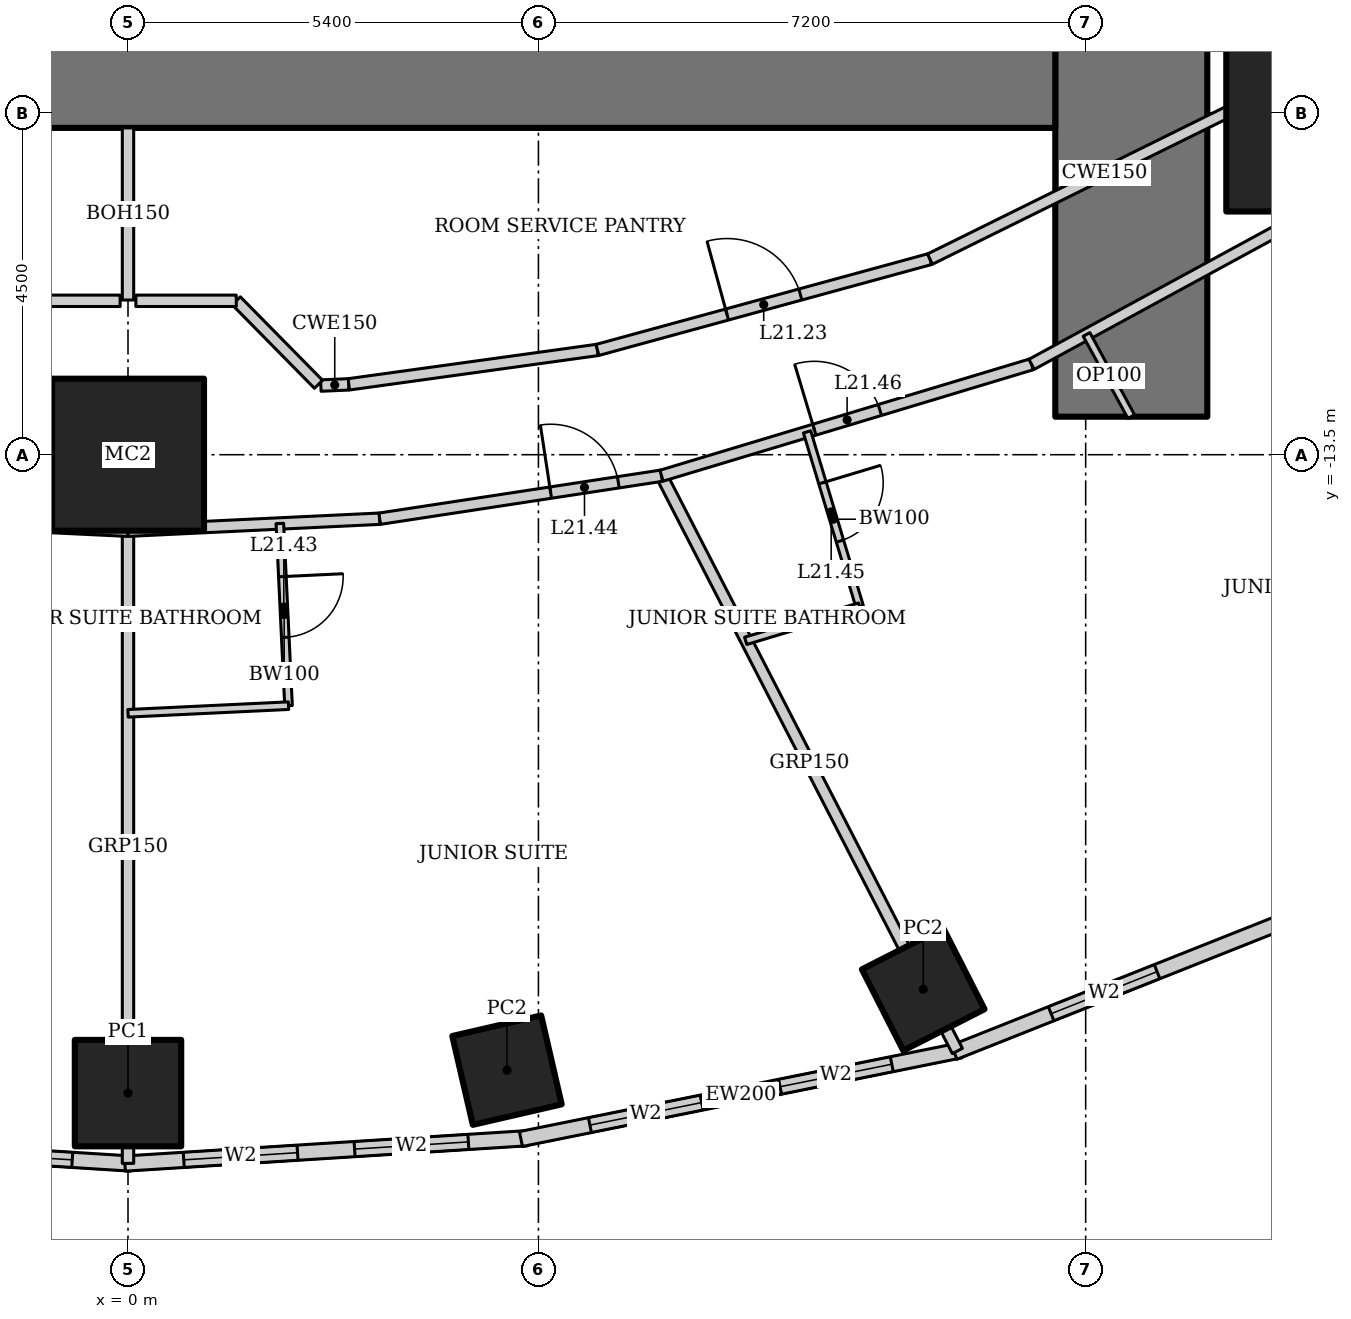
"""IFC4 building model, lengths in metres.
Left out: names, types, materials, properties, quantities, classifications, styles, units other than length and angle.
Written with IfcOpenShell. Run it as: python <this file> out.ifc"""

import sys

from ifc_helpers import new_model, si_unit, direction, frame, frame_2d, origin, origin_2d, place, context, subcontext, project, spatial, rectangle, hollow_rectangle, extrude, element, fill, save


model = new_model("IFC4")
c1 = context("Model", 3, precision=1e-05, world=origin(), true_north=direction((0.0, 1.0)))
c2 = subcontext(c1, "Body", "Model", "MODEL_VIEW")
j1 = project(units=[si_unit("LENGTHUNIT", "METRE"), si_unit("PLANEANGLEUNIT", "RADIAN")], contexts=[c1])
p1 = place(None, origin())
s1 = spatial("IfcSite", under=j1, at=p1, CompositionType="ELEMENT")
p2 = place(p1, origin())
s2 = spatial("IfcBuilding", under=s1, at=p2, CompositionType="ELEMENT")
p3 = place(p2, frame((0.0, 0.0, 91.0)))
s3 = spatial("IfcBuildingStorey", under=s2, at=p3, CompositionType="ELEMENT", Elevation=91.0)
p4 = place(p3, frame((0.0, -13.5, 0.0), z_axis=(0.0, 0.0, 1.0), x_axis=(1.0, 0.0, 0.0)))
e1 = element("IfcColumn", 1, at=p4, inside=s3, PredefinedType="COLUMN", context=c2, shape_type="SweptSolid", body=[
    extrude(hollow_rectangle(XDim=2.0, YDim=2.0, WallThickness=0.17, at=origin_2d()), origin(), (0.0, 0.0, 1.0), 3.6),
])
p5 = place(p3, frame((15.75, -9.0, 0.0), z_axis=(0.0, 0.0, 1.0), x_axis=(1.0, 0.0, 0.0)))
e2 = element("IfcColumn", 2, at=p5, inside=s3, PredefinedType="COLUMN", context=c2, shape_type="SweptSolid", body=[
    extrude(hollow_rectangle(XDim=2.6, YDim=2.6, WallThickness=0.13, at=origin_2d()), origin(), (0.0, 0.0, 1.0), 3.6),
])
p6 = place(p3, frame((0.0, -21.9, 0.0), z_axis=(0.0, 0.0, 1.0), x_axis=(1.0, 0.0, 0.0)))
e3 = element("IfcColumn", 3, at=p6, inside=s3, PredefinedType="COLUMN", context=c2, shape_type="SweptSolid", body=[
    extrude(hollow_rectangle(XDim=1.4, YDim=1.4, WallThickness=0.1, at=origin_2d()), origin(), (0.0, 0.0, 1.0), 3.6),
])
for number, where, z_axis, x_axis in (
    (4, (4.986, -21.598, 0.0), (0.0, 0.0, 1.0), (0.974, 0.225, 0.0)),
    (5, (10.463, -20.534, 0.0), (0.0, 0.0, 1.0), (0.891, 0.454, 0.0)),
):
    element("IfcColumn", number, at=place(p3, frame(where, z_axis=z_axis, x_axis=x_axis)), inside=s3, PredefinedType="COLUMN", context=c2, shape_type="SweptSolid", body=[
        extrude(hollow_rectangle(XDim=1.2, YDim=1.2, WallThickness=0.1, at=origin_2d()), origin(), (0.0, 0.0, 1.0), 3.6),
    ])
p7 = place(p3, frame((13.2, -13.0, 0.0), z_axis=(0.0, 0.0, 1.0), x_axis=(0.0, 1.0, 0.0)))
e6 = element("IfcWall", 6, at=p7, inside=s3, PredefinedType="SHEAR", context=c2, shape_type="SweptSolid", body=[
    extrude(rectangle(XDim=26.0, YDim=2.0, at=frame_2d((13.0, 0.0))), origin(), (0.0, 0.0, 1.0), 3.6),
])
p8 = place(p7, frame((12.1, 0.0, 0.0)))
e7 = element("IfcOpeningElement", 7, at=p8, cuts=e6, PredefinedType="OPENING", context=c2, shape_type="SweptSolid", body=[
    extrude(rectangle(XDim=1.8, YDim=2.1, at=frame_2d((0.9, 1.05))), frame((0.0, 1.01, 0.0), z_axis=(0.0, -1.0, 0.0), x_axis=(1.0, 0.0, 0.0)), (0.0, 0.0, 1.0), 2.02),
])
p9 = place(p3, frame((-12.2, -8.0, 0.0), z_axis=(0.0, 0.0, 1.0), x_axis=(1.0, 0.0, 0.0)))
e8 = element("IfcWall", 8, at=p9, inside=s3, PredefinedType="SHEAR", context=c2, shape_type="SweptSolid", body=[
    extrude(rectangle(XDim=24.4, YDim=2.4, at=frame_2d((12.2, 0.0))), origin(), (0.0, 0.0, 1.0), 3.6),
])
p10 = place(p3, frame((-5.253, -22.493, 0.0), z_axis=(0.0, 0.0, 1.0), x_axis=(0.998018582375, -0.062919863585, 0.0)))
e9 = element("IfcWall", 9, at=p10, inside=s3, PredefinedType="SOLIDWALL", context=c2, shape_type="SweptSolid", body=[
    extrude(rectangle(XDim=5.304, YDim=0.2, at=frame_2d((2.652, 0.0))), origin(), (0.0, 0.0, 1.0), 3.45),
])
p11 = place(p10, frame((0.776, 0.0, 0.5)))
e10 = element("IfcOpeningElement", 10, at=p11, cuts=e9, PredefinedType="OPENING", context=c2, shape_type="SweptSolid", body=[
    extrude(rectangle(XDim=1.5, YDim=2.2, at=frame_2d((0.75, 1.1))), frame((0.0, 0.11, 0.0), z_axis=(0.0, -1.0, 0.0), x_axis=(1.0, 0.0, 0.0)), (0.0, 0.0, 1.0), 0.22),
])
p12 = place(p10, frame((3.028, 0.0, 0.5)))
e11 = element("IfcOpeningElement", 11, at=p12, cuts=e9, PredefinedType="OPENING", context=c2, shape_type="SweptSolid", body=[
    extrude(rectangle(XDim=1.5, YDim=2.2, at=frame_2d((0.75, 1.1))), frame((0.0, 0.11, 0.0), z_axis=(0.0, -1.0, 0.0), x_axis=(1.0, 0.0, 0.0)), (0.0, 0.0, 1.0), 0.22),
])
p13 = place(p3, frame((-0.041, -22.827, 0.0), z_axis=(0.0, 0.0, 1.0), x_axis=(0.998018582375, 0.062919863585, 0.0)))
e12 = element("IfcWall", 12, at=p13, inside=s3, PredefinedType="SOLIDWALL", context=c2, shape_type="SweptSolid", body=[
    extrude(rectangle(XDim=5.304, YDim=0.2, at=frame_2d((2.652, 0.0))), origin(), (0.0, 0.0, 1.0), 3.45),
])
p14 = place(p13, frame((0.776, 0.0, 0.5)))
e13 = element("IfcOpeningElement", 13, at=p14, cuts=e12, PredefinedType="OPENING", context=c2, shape_type="SweptSolid", body=[
    extrude(rectangle(XDim=1.5, YDim=2.2, at=frame_2d((0.75, 1.1))), frame((0.0, 0.11, 0.0), z_axis=(0.0, -1.0, 0.0), x_axis=(1.0, 0.0, 0.0)), (0.0, 0.0, 1.0), 0.22),
])
p15 = place(p13, frame((3.028, 0.0, 0.5)))
e14 = element("IfcOpeningElement", 14, at=p15, cuts=e12, PredefinedType="OPENING", context=c2, shape_type="SweptSolid", body=[
    extrude(rectangle(XDim=1.5, YDim=2.2, at=frame_2d((0.75, 1.1))), frame((0.0, 0.11, 0.0), z_axis=(0.0, -1.0, 0.0), x_axis=(1.0, 0.0, 0.0)), (0.0, 0.0, 1.0), 0.22),
])
p16 = place(p3, frame((5.17, -22.504, 0.0), z_axis=(0.0, 0.0, 1.0), x_axis=(0.980251657452, 0.197754110105, 0.0)))
e15 = element("IfcWall", 15, at=p16, inside=s3, PredefinedType="SOLIDWALL", context=c2, shape_type="SweptSolid", body=[
    extrude(rectangle(XDim=5.904, YDim=0.2, at=frame_2d((2.952, 0.0))), origin(), (0.0, 0.0, 1.0), 3.45),
])
p17 = place(p16, frame((0.926, 0.0, 0.5)))
e16 = element("IfcOpeningElement", 16, at=p17, cuts=e15, PredefinedType="OPENING", context=c2, shape_type="SweptSolid", body=[
    extrude(rectangle(XDim=1.5, YDim=2.2, at=frame_2d((0.75, 1.1))), frame((0.0, 0.11, 0.0), z_axis=(0.0, -1.0, 0.0), x_axis=(1.0, 0.0, 0.0)), (0.0, 0.0, 1.0), 0.22),
])
p18 = place(p16, frame((3.478, 0.0, 0.5)))
e17 = element("IfcOpeningElement", 17, at=p18, cuts=e15, PredefinedType="OPENING", context=c2, shape_type="SweptSolid", body=[
    extrude(rectangle(XDim=1.5, YDim=2.2, at=frame_2d((0.75, 1.1))), frame((0.0, 0.11, 0.0), z_axis=(0.0, -1.0, 0.0), x_axis=(1.0, 0.0, 0.0)), (0.0, 0.0, 1.0), 0.22),
])
p19 = place(p3, frame((10.869, -21.363, 0.0), z_axis=(0.0, 0.0, 1.0), x_axis=(0.929358351251, 0.369178892895, 0.0)))
e18 = element("IfcWall", 18, at=p19, inside=s3, PredefinedType="SOLIDWALL", context=c2, shape_type="SweptSolid", body=[
    extrude(rectangle(XDim=7.692, YDim=0.2, at=frame_2d((3.846, 0.0))), origin(), (0.0, 0.0, 1.0), 3.45),
])
p20 = place(p19, frame((1.373, 0.0, 0.5)))
e19 = element("IfcOpeningElement", 19, at=p20, cuts=e18, PredefinedType="OPENING", context=c2, shape_type="SweptSolid", body=[
    extrude(rectangle(XDim=1.5, YDim=2.2, at=frame_2d((0.75, 1.1))), frame((0.0, 0.11, 0.0), z_axis=(0.0, -1.0, 0.0), x_axis=(1.0, 0.0, 0.0)), (0.0, 0.0, 1.0), 0.22),
])
p21 = place(p19, frame((4.819, 0.0, 0.5)))
e20 = element("IfcOpeningElement", 20, at=p21, cuts=e18, PredefinedType="OPENING", context=c2, shape_type="SweptSolid", body=[
    extrude(rectangle(XDim=1.5, YDim=2.2, at=frame_2d((0.75, 1.1))), frame((0.0, 0.11, 0.0), z_axis=(0.0, -1.0, 0.0), x_axis=(1.0, 0.0, 0.0)), (0.0, 0.0, 1.0), 0.22),
])
p22 = place(p3, frame((0.0, -22.825, 0.0), z_axis=(0.0, 0.0, 1.0), x_axis=(0.0, 1.0, 0.0)))
e21 = element("IfcWall", 21, at=p22, inside=s3, PredefinedType="PARTITIONING", context=c2, shape_type="SweptSolid", body=[
    extrude(rectangle(XDim=8.325, YDim=0.15, at=frame_2d((4.162, 0.0))), origin(), (0.0, 0.0, 1.0), 2.924),
])
p23 = place(p3, frame((10.912, -21.346, 0.0), z_axis=(0.0, 0.0, 1.0), x_axis=(-0.457327273085, 0.889298468059, 0.0)))
e22 = element("IfcWall", 22, at=p23, inside=s3, PredefinedType="PARTITIONING", context=c2, shape_type="SweptSolid", body=[
    extrude(rectangle(XDim=8.511, YDim=0.15, at=frame_2d((4.256, 0.0))), origin(), (0.0, 0.0, 1.0), 2.528),
])
p24 = place(p3, frame((-3.311, -14.342, 0.0), z_axis=(0.0, 0.0, 1.0), x_axis=(0.998863968075, -0.047652631422, 0.0)))
e23 = element("IfcWall", 23, at=p24, inside=s3, PredefinedType="PARTITIONING", context=c2, shape_type="SweptSolid", body=[
    extrude(rectangle(XDim=3.315, YDim=0.15, at=frame_2d((1.657, 0.0))), origin(), (0.0, 0.0, 1.0), 3.45),
])
p25 = place(p24, frame((0.15, 0.0, 0.0)))
e24 = element("IfcOpeningElement", 24, at=p25, cuts=e23, PredefinedType="OPENING", context=c2, shape_type="SweptSolid", body=[
    extrude(rectangle(XDim=0.9, YDim=2.1, at=frame_2d((0.45, 1.05))), frame((0.0, 0.085, 0.0), z_axis=(0.0, -1.0, 0.0), x_axis=(1.0, 0.0, 0.0)), (0.0, 0.0, 1.0), 0.17),
])
p26 = place(p3, frame((0.0, -14.5, 0.0), z_axis=(0.0, 0.0, 1.0), x_axis=(0.998863968075, 0.047652631422, 0.0)))
e25 = element("IfcWall", 25, at=p26, inside=s3, PredefinedType="PARTITIONING", context=c2, shape_type="SweptSolid", body=[
    extrude(rectangle(XDim=3.315, YDim=0.15, at=frame_2d((1.657, 0.0))), origin(), (0.0, 0.0, 1.0), 3.45),
])
p27 = place(p3, frame((3.311, -14.342, 0.0), z_axis=(0.0, 0.0, 1.0), x_axis=(0.988564270062, 0.150800145746, 0.0)))
e26 = element("IfcWall", 26, at=p27, inside=s3, PredefinedType="PARTITIONING", context=c2, shape_type="SweptSolid", body=[
    extrude(rectangle(XDim=3.751, YDim=0.15, at=frame_2d((1.875, 0.0))), origin(), (0.0, 0.0, 1.0), 3.45),
])
p28 = place(p27, frame((2.276, 0.0, 0.0)))
e27 = element("IfcOpeningElement", 27, at=p28, cuts=e26, PredefinedType="OPENING", context=c2, shape_type="SweptSolid", body=[
    extrude(rectangle(XDim=0.9, YDim=2.1, at=frame_2d((0.45, 1.05))), frame((0.0, 0.085, 0.0), z_axis=(0.0, -1.0, 0.0), x_axis=(1.0, 0.0, 0.0)), (0.0, 0.0, 1.0), 0.17),
])
p29 = place(p3, frame((7.019, -13.776, 0.0), z_axis=(0.0, 0.0, 1.0), x_axis=(0.957564241242, 0.288219922793, 0.0)))
e28 = element("IfcWall", 28, at=p29, inside=s3, PredefinedType="PARTITIONING", context=c2, shape_type="SweptSolid", body=[
    extrude(rectangle(XDim=5.085, YDim=0.15, at=frame_2d((2.542, 0.0))), origin(), (0.0, 0.0, 1.0), 3.45),
])
p30 = place(p29, frame((2.1, 0.0, 0.0)))
e29 = element("IfcOpeningElement", 29, at=p30, cuts=e28, PredefinedType="OPENING", context=c2, shape_type="SweptSolid", body=[
    extrude(rectangle(XDim=0.9, YDim=2.1, at=frame_2d((0.45, 1.05))), frame((0.0, 0.085, 0.0), z_axis=(0.0, -1.0, 0.0), x_axis=(1.0, 0.0, 0.0)), (0.0, 0.0, 1.0), 0.17),
])
p31 = place(p3, frame((11.888, -12.311, 0.0), z_axis=(0.0, 0.0, 1.0), x_axis=(0.878450059298, 0.477834169267, 0.0)))
e30 = element("IfcWall", 30, at=p31, inside=s3, PredefinedType="PARTITIONING", context=c2, shape_type="SweptSolid", body=[
    extrude(rectangle(XDim=5.631, YDim=0.15, at=frame_2d((2.815, 0.0))), origin(), (0.0, 0.0, 1.0), 3.45),
])
p32 = place(p3, frame((2.903, -12.574, 0.0), z_axis=(0.0, 0.0, 1.0), x_axis=(0.990563451353, 0.137054911782, 0.0)))
e31 = element("IfcWall", 31, at=p32, inside=s3, PredefinedType="PARTITIONING", context=c2, shape_type="SweptSolid", body=[
    extrude(rectangle(XDim=3.304, YDim=0.15, at=frame_2d((1.652, 0.0))), origin(), (0.0, 0.0, 1.0), 3.45),
])
p33 = place(p3, frame((6.176, -12.122, 0.0), z_axis=(0.0, 0.0, 1.0), x_axis=(0.964644466646, 0.263554648923, 0.0)))
e32 = element("IfcWall", 32, at=p33, inside=s3, PredefinedType="PARTITIONING", context=c2, shape_type="SweptSolid", body=[
    extrude(rectangle(XDim=4.535, YDim=0.15, at=frame_2d((2.268, 0.0))), origin(), (0.0, 0.0, 1.0), 3.45),
])
p34 = place(p33, frame((1.768, 0.0, 0.0)))
e33 = element("IfcOpeningElement", 33, at=p34, cuts=e32, PredefinedType="OPENING", context=c2, shape_type="SweptSolid", body=[
    extrude(rectangle(XDim=1.0, YDim=2.1, at=frame_2d((0.5, 1.05))), frame((0.0, 0.085, 0.0), z_axis=(0.0, -1.0, 0.0), x_axis=(1.0, 0.0, 0.0)), (0.0, 0.0, 1.0), 0.17),
])
p35 = place(p3, frame((10.551, -10.926, 0.0), z_axis=(0.0, 0.0, 1.0), x_axis=(0.89656943448, 0.442903205177, 0.0)))
e34 = element("IfcWall", 34, at=p35, inside=s3, PredefinedType="PARTITIONING", context=c2, shape_type="SweptSolid", body=[
    extrude(rectangle(XDim=5.126, YDim=0.15, at=frame_2d((2.563, 0.0))), origin(), (0.0, 0.0, 1.0), 3.45),
])
p36 = place(p3, frame((1.998, -14.405, 0.0), z_axis=(0.0, 0.0, 1.0), x_axis=(0.047608648396, -0.998866065395, 0.0)))
e35 = element("IfcWall", 35, at=p36, inside=s3, PredefinedType="PARTITIONING", context=c2, shape_type="SweptSolid", body=[
    extrude(rectangle(XDim=2.4, YDim=0.1, at=frame_2d((1.2, 0.0))), origin(), (0.0, 0.0, 1.0), 2.749),
])
p37 = place(p36, frame((0.7, 0.0, 0.0)))
e36 = element("IfcOpeningElement", 36, at=p37, cuts=e35, PredefinedType="OPENING", context=c2, shape_type="SweptSolid", body=[
    extrude(rectangle(XDim=0.8, YDim=2.1, at=frame_2d((0.4, 1.05))), frame((0.0, 0.06, 0.0), z_axis=(0.0, -1.0, 0.0), x_axis=(1.0, 0.0, 0.0)), (0.0, 0.0, 1.0), 0.12),
])
p38 = place(p3, frame((2.112, -16.802, 0.0), z_axis=(0.0, 0.0, 1.0), x_axis=(-0.998862383453, -0.047685835668, 0.0)))
e37 = element("IfcWall", 37, at=p38, inside=s3, PredefinedType="PARTITIONING", context=c2, shape_type="SweptSolid", body=[
    extrude(rectangle(XDim=2.115, YDim=0.1, at=frame_2d((1.057, 0.0))), origin(), (0.0, 0.0, 1.0), 3.45),
])
p39 = place(p3, frame((8.935, -13.2, 0.0), z_axis=(0.0, 0.0, 1.0), x_axis=(0.288197066254, -0.957571120598, 0.0)))
e38 = element("IfcWall", 38, at=p39, inside=s3, PredefinedType="PARTITIONING", context=c2, shape_type="SweptSolid", body=[
    extrude(rectangle(XDim=2.4, YDim=0.1, at=frame_2d((1.2, 0.0))), origin(), (0.0, 0.0, 1.0), 3.45),
])
p40 = place(p39, frame((0.7, 0.0, 0.0)))
e39 = element("IfcOpeningElement", 39, at=p40, cuts=e38, PredefinedType="OPENING", context=c2, shape_type="SweptSolid", body=[
    extrude(rectangle(XDim=0.8, YDim=2.1, at=frame_2d((0.4, 1.05))), frame((0.0, 0.06, 0.0), z_axis=(0.0, -1.0, 0.0), x_axis=(1.0, 0.0, 0.0)), (0.0, 0.0, 1.0), 0.12),
])
p41 = place(p3, frame((9.626, -15.498, 0.0), z_axis=(0.0, 0.0, 1.0), x_axis=(-0.957551231109, -0.288263143328, 0.0)))
e40 = element("IfcWall", 40, at=p41, inside=s3, PredefinedType="PARTITIONING", context=c2, shape_type="SweptSolid", body=[
    extrude(rectangle(XDim=1.566, YDim=0.1, at=frame_2d((0.783, 0.0))), origin(), (0.0, 0.0, 1.0), 3.45),
])
p42 = place(p3, frame((13.2, -13.0, 0.0), z_axis=(0.0, 0.0, 1.0), x_axis=(-0.477852414256, 0.878440134665, 0.0)))
e41 = element("IfcWall", 41, at=p42, inside=s3, PredefinedType="PARTITIONING", context=c2, shape_type="SweptSolid", body=[
    extrude(rectangle(XDim=1.232, YDim=0.1, at=frame_2d((0.616, 0.0))), origin(), (0.0, 0.0, 1.0), 3.45),
])
p43 = place(p3, frame((2.537, -12.59, 0.0), z_axis=(0.0, 0.0, 1.0), x_axis=(0.999061181733, 0.04332153223, 0.0)))
e42 = element("IfcWall", 42, at=p43, inside=s3, PredefinedType="PARTITIONING", context=c2, shape_type="SweptSolid", body=[
    extrude(rectangle(XDim=0.366, YDim=0.15, at=frame_2d((0.183, 0.0))), origin(), (0.0, 0.0, 1.0), 3.45),
])
p44 = place(p3, frame((0.0, -9.2, 0.0), z_axis=(0.0, 0.0, 1.0), x_axis=(0.0, -1.0, 0.0)))
e43 = element("IfcWall", 43, at=p44, inside=s3, PredefinedType="PARTITIONING", context=c2, shape_type="SweptSolid", body=[
    extrude(rectangle(XDim=2.265, YDim=0.15, at=frame_2d((1.133, 0.0))), origin(), (0.0, 0.0, 1.0), 3.044),
])
p45 = place(p3, frame((-1.425, -11.475, 0.0), z_axis=(0.0, 0.0, 1.0), x_axis=(1.0, 0.0, 0.0)))
e44 = element("IfcWall", 44, at=p45, inside=s3, PredefinedType="PARTITIONING", context=c2, shape_type="SweptSolid", body=[
    extrude(rectangle(XDim=1.321, YDim=0.15, at=frame_2d((0.661, 0.0))), origin(), (0.0, 0.0, 1.0), 3.45),
])
p46 = place(p3, frame((1.425, -11.475, 0.0), z_axis=(0.0, 0.0, 1.0), x_axis=(0.701622806479, -0.712548550927, 0.0)))
e45 = element("IfcWall", 45, at=p46, inside=s3, PredefinedType="PARTITIONING", context=c2, shape_type="SweptSolid", body=[
    extrude(rectangle(XDim=1.542, YDim=0.15, at=frame_2d((0.771, 0.0))), origin(), (0.0, 0.0, 1.0), 3.45),
])
p47 = place(p3, frame((0.103, -11.475, 0.0), z_axis=(0.0, 0.0, 1.0), x_axis=(1.0, 0.0, 0.0)))
e46 = element("IfcWall", 46, at=p47, inside=s3, PredefinedType="PARTITIONING", context=c2, shape_type="SweptSolid", body=[
    extrude(rectangle(XDim=1.321, YDim=0.15, at=frame_2d((0.661, 0.0))), origin(), (0.0, 0.0, 1.0), 3.45),
])
p48 = place(p12, origin())
e47 = element("IfcWindow", 47, at=p48, inside=s3, PartitioningType="SINGLE_PANEL", PredefinedType="WINDOW", context=c2, shape_type="SweptSolid", body=[
    extrude(rectangle(XDim=1.5, YDim=2.2, at=frame_2d((0.75, 1.1))), frame((0.0, 0.03, 0.0), z_axis=(0.0, -1.0, 0.0), x_axis=(1.0, 0.0, 0.0)), (0.0, 0.0, 1.0), 0.06),
])
fill(e11, e47)
p49 = place(p14, origin())
e48 = element("IfcWindow", 48, at=p49, inside=s3, PartitioningType="SINGLE_PANEL", PredefinedType="WINDOW", context=c2, shape_type="SweptSolid", body=[
    extrude(rectangle(XDim=1.5, YDim=2.2, at=frame_2d((0.75, 1.1))), frame((0.0, 0.03, 0.0), z_axis=(0.0, -1.0, 0.0), x_axis=(1.0, 0.0, 0.0)), (0.0, 0.0, 1.0), 0.06),
])
fill(e13, e48)
p50 = place(p15, origin())
e49 = element("IfcWindow", 49, at=p50, inside=s3, PartitioningType="SINGLE_PANEL", PredefinedType="WINDOW", context=c2, shape_type="SweptSolid", body=[
    extrude(rectangle(XDim=1.5, YDim=2.2, at=frame_2d((0.75, 1.1))), frame((0.0, 0.03, 0.0), z_axis=(0.0, -1.0, 0.0), x_axis=(1.0, 0.0, 0.0)), (0.0, 0.0, 1.0), 0.06),
])
fill(e14, e49)
p51 = place(p17, origin())
e50 = element("IfcWindow", 50, at=p51, inside=s3, PartitioningType="SINGLE_PANEL", PredefinedType="WINDOW", context=c2, shape_type="SweptSolid", body=[
    extrude(rectangle(XDim=1.5, YDim=2.2, at=frame_2d((0.75, 1.1))), frame((0.0, 0.03, 0.0), z_axis=(0.0, -1.0, 0.0), x_axis=(1.0, 0.0, 0.0)), (0.0, 0.0, 1.0), 0.06),
])
fill(e16, e50)
p52 = place(p18, origin())
e51 = element("IfcWindow", 51, at=p52, inside=s3, PartitioningType="SINGLE_PANEL", PredefinedType="WINDOW", context=c2, shape_type="SweptSolid", body=[
    extrude(rectangle(XDim=1.5, YDim=2.2, at=frame_2d((0.75, 1.1))), frame((0.0, 0.03, 0.0), z_axis=(0.0, -1.0, 0.0), x_axis=(1.0, 0.0, 0.0)), (0.0, 0.0, 1.0), 0.06),
])
fill(e17, e51)
p53 = place(p20, origin())
e52 = element("IfcWindow", 52, at=p53, inside=s3, PartitioningType="SINGLE_PANEL", PredefinedType="WINDOW", context=c2, shape_type="SweptSolid", body=[
    extrude(rectangle(XDim=1.5, YDim=2.2, at=frame_2d((0.75, 1.1))), frame((0.0, 0.03, 0.0), z_axis=(0.0, -1.0, 0.0), x_axis=(1.0, 0.0, 0.0)), (0.0, 0.0, 1.0), 0.06),
])
fill(e19, e52)
p54 = place(p34, origin())
e53 = element("IfcDoor", 53, at=p54, inside=s3, OperationType="SINGLE_SWING_LEFT", PredefinedType="DOOR", context=c2, shape_type="SweptSolid", body=[
    extrude(rectangle(XDim=1.0, YDim=2.1, at=frame_2d((0.5, 1.05))), frame((0.0, 0.025, 0.0), z_axis=(0.0, -1.0, 0.0), x_axis=(1.0, 0.0, 0.0)), (0.0, 0.0, 1.0), 0.05),
])
fill(e33, e53)
p55 = place(p37, origin())
e54 = element("IfcDoor", 54, at=p55, inside=s3, OperationType="SINGLE_SWING_LEFT", PredefinedType="DOOR", context=c2, shape_type="SweptSolid", body=[
    extrude(rectangle(XDim=0.8, YDim=2.1, at=frame_2d((0.4, 1.05))), frame((0.0, 0.025, 0.0), z_axis=(0.0, -1.0, 0.0), x_axis=(1.0, 0.0, 0.0)), (0.0, 0.0, 1.0), 0.05),
])
fill(e36, e54)
p56 = place(p28, origin())
e55 = element("IfcDoor", 55, at=p56, inside=s3, OperationType="SINGLE_SWING_LEFT", PredefinedType="DOOR", context=c2, shape_type="SweptSolid", body=[
    extrude(rectangle(XDim=0.9, YDim=2.1, at=frame_2d((0.45, 1.05))), frame((0.0, 0.025, 0.0), z_axis=(0.0, -1.0, 0.0), x_axis=(1.0, 0.0, 0.0)), (0.0, 0.0, 1.0), 0.05),
])
fill(e27, e55)
p57 = place(p40, origin())
e56 = element("IfcDoor", 56, at=p57, inside=s3, OperationType="SINGLE_SWING_LEFT", PredefinedType="DOOR", context=c2, shape_type="SweptSolid", body=[
    extrude(rectangle(XDim=0.8, YDim=2.1, at=frame_2d((0.4, 1.05))), frame((0.0, 0.025, 0.0), z_axis=(0.0, -1.0, 0.0), x_axis=(1.0, 0.0, 0.0)), (0.0, 0.0, 1.0), 0.05),
])
fill(e39, e56)
p58 = place(p30, origin())
e57 = element("IfcDoor", 57, at=p58, inside=s3, OperationType="SINGLE_SWING_LEFT", PredefinedType="DOOR", context=c2, shape_type="SweptSolid", body=[
    extrude(rectangle(XDim=0.9, YDim=2.1, at=frame_2d((0.45, 1.05))), frame((0.0, 0.025, 0.0), z_axis=(0.0, -1.0, 0.0), x_axis=(1.0, 0.0, 0.0)), (0.0, 0.0, 1.0), 0.05),
])
fill(e29, e57)
save(model, sys.argv[1])
